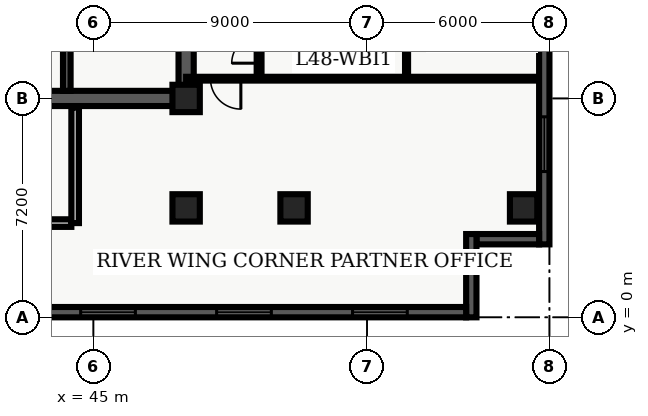
"""IFC4 building model, lengths in metres.
Left out: names, types, materials, properties, quantities, classifications, styles, units other than length and angle.
Written with IfcOpenShell. Run it as: python <this file> out.ifc"""

import sys

from ifc_helpers import new_model, entity, si_unit, converted_unit, direction, frame, origin_with_axes, origin_2d_with_axis, place, context, subcontext, project, spatial, polyline, rectangle, outline, extrude, element, fill, save


model = new_model("IFC4")
c1 = context("Model", 3, precision=1e-05, world=origin_with_axes(), true_north=direction((0.0, 1.0)))
c2 = subcontext(c1, "Body", "Model", "MODEL_VIEW")
j1 = project(units=[si_unit("LENGTHUNIT", "METRE"), converted_unit("PLANEANGLEUNIT", "DEGREE", entity("IfcPlaneAngleMeasure", 0.017), si_unit("PLANEANGLEUNIT", "RADIAN"), dimensions=[0, 0, 0, 0, 0, 0, 0])], contexts=[c1])
p1 = place(None, origin_with_axes())
s1 = spatial("IfcSite", under=j1, at=p1, CompositionType="ELEMENT")
p2 = place(p1, origin_with_axes())
s2 = spatial("IfcBuilding", under=s1, at=p2, CompositionType="ELEMENT")
p3 = place(p2, frame((0.0, 0.0, 196.5), z_axis=(0.0, 0.0, 1.0), x_axis=(1.0, 0.0, 0.0)))
s3 = spatial("IfcBuildingStorey", under=s2, at=p3, CompositionType="ELEMENT", Elevation=196.5)
p4 = place(p3, frame((40.2, 7.2, 0.0), z_axis=(0.0, 0.0, 1.0), x_axis=(1.0, 0.0, 0.0)))
e1 = element("IfcWall", 1, at=p4, inside=s3, PredefinedType="SHEAR", context=c2, shape_type="SweptSolid", body=[
    extrude(outline(polyline([(0.0, -0.25), (7.85, -0.25), (7.85, 0.25), (0.0, 0.25), (0.0, -0.25)])), origin_with_axes(), (0.0, 0.0, 1.0), 3.66),
])
p5 = place(p4, frame((2.175, 0.0, 0.0), z_axis=(0.0, 0.0, 1.0), x_axis=(1.0, 0.0, 0.0)))
e2 = element("IfcOpeningElement", 2, at=p5, cuts=e1, PredefinedType="OPENING", context=c2, shape_type="SweptSolid", body=[
    extrude(rectangle(XDim=1.05, YDim=0.52, at=origin_2d_with_axis()), origin_with_axes(), (0.0, 0.0, 1.0), 2.15),
])
p6 = place(p3, frame((48.05, 7.2, 0.0), z_axis=(0.0, 0.0, 1.0), x_axis=(0.0, 1.0, 0.0)))
e3 = element("IfcWall", 3, at=p6, inside=s3, PredefinedType="SHEAR", context=c2, shape_type="SweptSolid", body=[
    extrude(outline(polyline([(0.0, -0.25), (15.6, -0.25), (15.6, 0.25), (0.0, 0.25), (0.0, -0.25)])), origin_with_axes(), (0.0, 0.0, 1.0), 3.66),
])
p7 = place(p6, frame((5.975, 0.0, 0.0), z_axis=(0.0, 0.0, 1.0), x_axis=(1.0, 0.0, 0.0)))
e4 = element("IfcOpeningElement", 4, at=p7, cuts=e3, PredefinedType="OPENING", context=c2, shape_type="SweptSolid", body=[
    extrude(rectangle(XDim=1.05, YDim=0.52, at=origin_2d_with_axis()), origin_with_axes(), (0.0, 0.0, 1.0), 2.15),
])
p8 = place(p6, frame((2.725, 0.0, 0.0), z_axis=(0.0, 0.0, 1.0), x_axis=(1.0, 0.0, 0.0)))
e5 = element("IfcOpeningElement", 5, at=p8, cuts=e3, PredefinedType="OPENING", context=c2, shape_type="SweptSolid", body=[
    extrude(rectangle(XDim=0.95, YDim=0.52, at=origin_2d_with_axis()), origin_with_axes(), (0.0, 0.0, 1.0), 2.15),
])
p9 = place(p3, frame((44.125, 7.45, 0.0), z_axis=(0.0, 0.0, 1.0), x_axis=(0.0, 1.0, 0.0)))
e6 = element("IfcWall", 6, at=p9, inside=s3, PredefinedType="SHEAR", context=c2, shape_type="SweptSolid", body=[
    extrude(outline(polyline([(0.0, -0.125), (15.1, -0.125), (15.1, 0.125), (0.0, 0.125), (0.0, -0.125)])), origin_with_axes(), (0.0, 0.0, 1.0), 3.66),
])
p10 = place(p3, frame((40.325, 3.1, 0.0), z_axis=(0.0, 0.0, 1.0), x_axis=(1.0, 0.0, 0.0)))
e7 = element("IfcWall", 7, at=p10, inside=s3, PredefinedType="SOLIDWALL", context=c2, shape_type="SweptSolid", body=[
    extrude(outline(polyline([(0.0, -0.125), (3.95, -0.125), (3.95, 0.125), (0.0, 0.125), (0.0, -0.125)])), origin_with_axes(), (0.0, 0.0, 1.0), 2.7),
])
p11 = place(p3, frame((44.4, 3.1, 0.0), z_axis=(0.0, 0.0, 1.0), x_axis=(0.0, 1.0, 0.0)))
e8 = element("IfcWall", 8, at=p11, inside=s3, PredefinedType="SOLIDWALL", context=c2, shape_type="SweptSolid", body=[
    extrude(outline(polyline([(0.0, -0.125), (3.8, -0.125), (3.8, 0.125), (0.0, 0.125), (0.0, -0.125)])), origin_with_axes(), (0.0, 0.0, 1.0), 2.7),
])
for number, where, z_axis, x_axis in (
    (9, (48.05, 3.6, 0.0), (0.0, 0.0, 1.0), (1.0, 0.0, 0.0)),
    (10, (48.05, 7.2, 0.0), (0.0, 0.0, 1.0), (1.0, 0.0, 0.0)),
    (11, (51.6, 3.6, 0.0), (0.0, 0.0, 1.0), (1.0, 0.0, 0.0)),
    (12, (59.15, 3.6, 0.0), (0.0, 0.0, 1.0), (1.0, 0.0, 0.0)),
):
    element("IfcColumn", number, at=place(p3, frame(where, z_axis=z_axis, x_axis=x_axis)), inside=s3, PredefinedType="COLUMN", context=c2, shape_type="SweptSolid", body=[
        extrude(rectangle(XDim=0.9, YDim=0.9, at=origin_2d_with_axis()), origin_with_axes(), (0.0, 0.0, 1.0), 3.9),
    ])
p12 = place(p3, frame((50.45, 7.85, 0.0), z_axis=(0.0, 0.0, 1.0), x_axis=(0.0, 1.0, 0.0)))
e13 = element("IfcWall", 13, at=p12, inside=s3, PredefinedType="PARTITIONING", context=c2, shape_type="SweptSolid", body=[
    extrude(outline(polyline([(0.0, -0.08), (18.8, -0.08), (18.8, 0.08), (0.0, 0.08), (0.0, -0.08)])), origin_with_axes(), (0.0, 0.0, 1.0), 2.7),
])
p13 = place(p12, frame((0.96, 0.0, 0.0), z_axis=(0.0, 0.0, 1.0), x_axis=(1.0, 0.0, 0.0)))
e14 = element("IfcOpeningElement", 14, at=p13, cuts=e13, PredefinedType="OPENING", context=c2, shape_type="SweptSolid", body=[
    extrude(rectangle(XDim=0.9, YDim=0.18, at=origin_2d_with_axis()), origin_with_axes(), (0.0, 0.0, 1.0), 2.15),
])
p14 = place(p12, frame((6.888, 0.0, 0.0), z_axis=(0.0, 0.0, 1.0), x_axis=(1.0, 0.0, 0.0)))
e15 = element("IfcOpeningElement", 15, at=p14, cuts=e13, PredefinedType="OPENING", context=c2, shape_type="SweptSolid", body=[
    extrude(rectangle(XDim=1.0, YDim=0.18, at=origin_2d_with_axis()), origin_with_axes(), (0.0, 0.0, 1.0), 2.15),
])
p15 = place(p12, frame((12.353, 0.0, 0.0), z_axis=(0.0, 0.0, 1.0), x_axis=(1.0, 0.0, 0.0)))
e16 = element("IfcOpeningElement", 16, at=p15, cuts=e13, PredefinedType="OPENING", context=c2, shape_type="SweptSolid", body=[
    extrude(rectangle(XDim=1.0, YDim=0.18, at=origin_2d_with_axis()), origin_with_axes(), (0.0, 0.0, 1.0), 2.15),
])
p16 = place(p12, frame((17.575, 0.0, 0.0), z_axis=(0.0, 0.0, 1.0), x_axis=(1.0, 0.0, 0.0)))
e17 = element("IfcOpeningElement", 17, at=p16, cuts=e13, PredefinedType="OPENING", context=c2, shape_type="SweptSolid", body=[
    extrude(rectangle(XDim=1.0, YDim=0.18, at=origin_2d_with_axis()), origin_with_axes(), (0.0, 0.0, 1.0), 2.15),
])
p17 = place(p3, frame((59.665, 7.85, 0.0), z_axis=(0.0, 0.0, 1.0), x_axis=(-1.0, 0.0, 0.0)))
e18 = element("IfcWall", 18, at=p17, inside=s3, PredefinedType="PARTITIONING", context=c2, shape_type="SweptSolid", body=[
    extrude(outline(polyline([(0.0, -0.062), (11.615, -0.062), (11.615, 0.062), (0.0, 0.062), (0.0, -0.062)])), origin_with_axes(), (0.0, 0.0, 1.0), 2.7),
])
p18 = place(p17, frame((10.315, 0.0, 0.0), z_axis=(0.0, 0.0, 1.0), x_axis=(1.0, 0.0, 0.0)))
e19 = element("IfcOpeningElement", 19, at=p18, cuts=e18, PredefinedType="OPENING", context=c2, shape_type="SweptSolid", body=[
    extrude(rectangle(XDim=1.0, YDim=0.145, at=origin_2d_with_axis()), origin_with_axes(), (0.0, 0.0, 1.0), 2.15),
])
p19 = place(p3, frame((55.3, 7.98, 0.0), z_axis=(0.0, 0.0, 1.0), x_axis=(0.0, 1.0, 0.0)))
e20 = element("IfcWall", 20, at=p19, inside=s3, PredefinedType="PARTITIONING", context=c2, shape_type="SweptSolid", body=[
    extrude(outline(polyline([(0.0, -0.05), (18.54, -0.05), (18.54, 0.05), (0.0, 0.05), (0.0, -0.05)])), origin_with_axes(), (0.0, 0.0, 1.0), 2.7),
])
p20 = place(p19, frame((2.079, 0.0, 0.0), z_axis=(0.0, 0.0, 1.0), x_axis=(1.0, 0.0, 0.0)))
e21 = element("IfcOpeningElement", 21, at=p20, cuts=e20, PredefinedType="OPENING", context=c2, shape_type="SweptSolid", body=[
    extrude(rectangle(XDim=0.95, YDim=0.12, at=origin_2d_with_axis()), origin_with_axes(), (0.0, 0.0, 1.0), 2.15),
])
p21 = place(p19, frame((6.758, 0.0, 0.0), z_axis=(0.0, 0.0, 1.0), x_axis=(1.0, 0.0, 0.0)))
e22 = element("IfcOpeningElement", 22, at=p21, cuts=e20, PredefinedType="OPENING", context=c2, shape_type="SweptSolid", body=[
    extrude(rectangle(XDim=0.95, YDim=0.12, at=origin_2d_with_axis()), origin_with_axes(), (0.0, 0.0, 1.0), 2.15),
])
p22 = place(p19, frame((12.223, 0.0, 0.0), z_axis=(0.0, 0.0, 1.0), x_axis=(1.0, 0.0, 0.0)))
e23 = element("IfcOpeningElement", 23, at=p22, cuts=e20, PredefinedType="OPENING", context=c2, shape_type="SweptSolid", body=[
    extrude(rectangle(XDim=0.95, YDim=0.12, at=origin_2d_with_axis()), origin_with_axes(), (0.0, 0.0, 1.0), 2.15),
])
p23 = place(p19, frame((16.885, 0.0, 0.0), z_axis=(0.0, 0.0, 1.0), x_axis=(1.0, 0.0, 0.0)))
e24 = element("IfcOpeningElement", 24, at=p23, cuts=e20, PredefinedType="OPENING", context=c2, shape_type="SweptSolid", body=[
    extrude(rectangle(XDim=0.95, YDim=0.12, at=origin_2d_with_axis()), origin_with_axes(), (0.0, 0.0, 1.0), 2.15),
])
p24 = place(p3, frame((59.83, 26.06, 0.0), z_axis=(0.0, 0.0, 1.0), x_axis=(0.0, -1.0, 0.0)))
e25 = element("IfcWall", 25, at=p24, inside=s3, PredefinedType="SOLIDWALL", context=c2, shape_type="SweptSolid", body=[
    extrude(outline(polyline([(0.0, -0.17), (23.66, -0.17), (23.66, 0.17), (0.0, 0.17), (0.0, -0.17)])), origin_with_axes(), (0.0, 0.0, 1.0), 3.66),
])
p25 = place(p24, frame((11.83, 0.0, 0.45), z_axis=(0.0, 0.0, 1.0), x_axis=(1.0, 0.0, 0.0)))
e26 = element("IfcOpeningElement", 26, at=p25, cuts=e25, PredefinedType="OPENING", context=c2, shape_type="SweptSolid", body=[
    extrude(rectangle(XDim=1.8, YDim=0.36, at=origin_2d_with_axis()), origin_with_axes(), (0.0, 0.0, 1.0), 2.1),
])
p26 = place(p24, frame((20.364, 0.0, 0.45), z_axis=(0.0, 0.0, 1.0), x_axis=(1.0, 0.0, 0.0)))
e27 = element("IfcOpeningElement", 27, at=p26, cuts=e25, PredefinedType="OPENING", context=c2, shape_type="SweptSolid", body=[
    extrude(rectangle(XDim=1.8, YDim=0.36, at=origin_2d_with_axis()), origin_with_axes(), (0.0, 0.0, 1.0), 2.1),
])
p27 = place(p3, frame((59.66, 2.57, 0.0), z_axis=(0.0, 0.0, 1.0), x_axis=(-1.0, 0.0, 0.0)))
e28 = element("IfcWall", 28, at=p27, inside=s3, PredefinedType="SOLIDWALL", context=c2, shape_type="SweptSolid", body=[
    extrude(outline(polyline([(0.0, -0.17), (2.06, -0.17), (2.06, 0.17), (0.0, 0.17), (0.0, -0.17)])), origin_with_axes(), (0.0, 0.0, 1.0), 3.66),
])
p28 = place(p3, frame((57.43, 2.74, 0.0), z_axis=(0.0, 0.0, 1.0), x_axis=(0.0, -1.0, 0.0)))
e29 = element("IfcWall", 29, at=p28, inside=s3, PredefinedType="SOLIDWALL", context=c2, shape_type="SweptSolid", body=[
    extrude(outline(polyline([(0.0, -0.17), (2.74, -0.17), (2.74, 0.17), (0.0, 0.17), (0.0, -0.17)])), origin_with_axes(), (0.0, 0.0, 1.0), 3.66),
])
p29 = place(p3, frame((57.26, 0.17, 0.0), z_axis=(0.0, 0.0, 1.0), x_axis=(-1.0, 0.0, 0.0)))
e30 = element("IfcWall", 30, at=p29, inside=s3, PredefinedType="SOLIDWALL", context=c2, shape_type="SweptSolid", body=[
    extrude(outline(polyline([(0.0, -0.17), (54.86, -0.17), (54.86, 0.17), (0.0, 0.17), (0.0, -0.17)])), origin_with_axes(), (0.0, 0.0, 1.0), 3.66),
])
p30 = place(p29, frame((2.836, 0.0, 0.45), z_axis=(0.0, 0.0, 1.0), x_axis=(1.0, 0.0, 0.0)))
e31 = element("IfcOpeningElement", 31, at=p30, cuts=e30, PredefinedType="OPENING", context=c2, shape_type="SweptSolid", body=[
    extrude(rectangle(XDim=1.8, YDim=0.36, at=origin_2d_with_axis()), origin_with_axes(), (0.0, 0.0, 1.0), 2.1),
])
p31 = place(p29, frame((7.307, 0.0, 0.45), z_axis=(0.0, 0.0, 1.0), x_axis=(1.0, 0.0, 0.0)))
e32 = element("IfcOpeningElement", 32, at=p31, cuts=e30, PredefinedType="OPENING", context=c2, shape_type="SweptSolid", body=[
    extrude(rectangle(XDim=1.8, YDim=0.36, at=origin_2d_with_axis()), origin_with_axes(), (0.0, 0.0, 1.0), 2.1),
])
p32 = place(p29, frame((11.779, 0.0, 0.45), z_axis=(0.0, 0.0, 1.0), x_axis=(1.0, 0.0, 0.0)))
e33 = element("IfcOpeningElement", 33, at=p32, cuts=e30, PredefinedType="OPENING", context=c2, shape_type="SweptSolid", body=[
    extrude(rectangle(XDim=1.8, YDim=0.36, at=origin_2d_with_axis()), origin_with_axes(), (0.0, 0.0, 1.0), 2.1),
])
p33 = place(p29, frame((16.251, 0.0, 0.45), z_axis=(0.0, 0.0, 1.0), x_axis=(1.0, 0.0, 0.0)))
e34 = element("IfcOpeningElement", 34, at=p33, cuts=e30, PredefinedType="OPENING", context=c2, shape_type="SweptSolid", body=[
    extrude(rectangle(XDim=1.8, YDim=0.36, at=origin_2d_with_axis()), origin_with_axes(), (0.0, 0.0, 1.0), 2.1),
])
p34 = place(p29, frame((20.723, 0.0, 0.45), z_axis=(0.0, 0.0, 1.0), x_axis=(1.0, 0.0, 0.0)))
e35 = element("IfcOpeningElement", 35, at=p34, cuts=e30, PredefinedType="OPENING", context=c2, shape_type="SweptSolid", body=[
    extrude(rectangle(XDim=1.8, YDim=0.36, at=origin_2d_with_axis()), origin_with_axes(), (0.0, 0.0, 1.0), 2.1),
])
p35 = place(p29, frame((34.138, 0.0, 0.45), z_axis=(0.0, 0.0, 1.0), x_axis=(1.0, 0.0, 0.0)))
e36 = element("IfcOpeningElement", 36, at=p35, cuts=e30, PredefinedType="OPENING", context=c2, shape_type="SweptSolid", body=[
    extrude(rectangle(XDim=1.8, YDim=0.36, at=origin_2d_with_axis()), origin_with_axes(), (0.0, 0.0, 1.0), 2.1),
])
p36 = place(p29, frame((38.609, 0.0, 0.45), z_axis=(0.0, 0.0, 1.0), x_axis=(1.0, 0.0, 0.0)))
e37 = element("IfcOpeningElement", 37, at=p36, cuts=e30, PredefinedType="OPENING", context=c2, shape_type="SweptSolid", body=[
    extrude(rectangle(XDim=1.8, YDim=0.36, at=origin_2d_with_axis()), origin_with_axes(), (0.0, 0.0, 1.0), 2.1),
])
p37 = place(p29, frame((43.531, 0.0, 0.45), z_axis=(0.0, 0.0, 1.0), x_axis=(1.0, 0.0, 0.0)))
e38 = element("IfcOpeningElement", 38, at=p37, cuts=e30, PredefinedType="OPENING", context=c2, shape_type="SweptSolid", body=[
    extrude(rectangle(XDim=1.8, YDim=0.36, at=origin_2d_with_axis()), origin_with_axes(), (0.0, 0.0, 1.0), 2.1),
])
p38 = place(p29, frame((47.553, 0.0, 0.45), z_axis=(0.0, 0.0, 1.0), x_axis=(1.0, 0.0, 0.0)))
e39 = element("IfcOpeningElement", 39, at=p38, cuts=e30, PredefinedType="OPENING", context=c2, shape_type="SweptSolid", body=[
    extrude(rectangle(XDim=1.8, YDim=0.36, at=origin_2d_with_axis()), origin_with_axes(), (0.0, 0.0, 1.0), 2.1),
])
p39 = place(p29, frame((52.024, 0.0, 0.45), z_axis=(0.0, 0.0, 1.0), x_axis=(1.0, 0.0, 0.0)))
e40 = element("IfcOpeningElement", 40, at=p39, cuts=e30, PredefinedType="OPENING", context=c2, shape_type="SweptSolid", body=[
    extrude(rectangle(XDim=1.8, YDim=0.36, at=origin_2d_with_axis()), origin_with_axes(), (0.0, 0.0, 1.0), 2.1),
])
p40 = place(p17, frame((10.315, 0.0, 0.0), z_axis=(0.0, 0.0, 1.0), x_axis=(1.0, 0.0, 0.0)))
e41 = element("IfcDoor", 41, at=p40, inside=s3, OperationType="SINGLE_SWING_LEFT", PredefinedType="DOOR", context=c2, shape_type="SweptSolid", body=[
    extrude(rectangle(XDim=1.0, YDim=0.075, at=origin_2d_with_axis()), origin_with_axes(), (0.0, 0.0, 1.0), 2.15),
])
fill(e19, e41)
p41 = place(p12, frame((0.96, 0.0, 0.0), z_axis=(0.0, 0.0, 1.0), x_axis=(1.0, 0.0, 0.0)))
e42 = element("IfcDoor", 42, at=p41, inside=s3, OperationType="SINGLE_SWING_LEFT", PredefinedType="DOOR", context=c2, shape_type="SweptSolid", body=[
    extrude(rectangle(XDim=0.9, YDim=0.09, at=origin_2d_with_axis()), origin_with_axes(), (0.0, 0.0, 1.0), 2.15),
])
fill(e14, e42)
p42 = place(p24, frame((20.364, 0.0, 0.45), z_axis=(0.0, 0.0, 1.0), x_axis=(1.0, 0.0, 0.0)))
e43 = element("IfcWindow", 43, at=p42, inside=s3, PredefinedType="WINDOW", context=c2, shape_type="SweptSolid", body=[
    extrude(rectangle(XDim=1.8, YDim=0.09, at=origin_2d_with_axis()), origin_with_axes(), (0.0, 0.0, 1.0), 2.1),
])
fill(e27, e43)
p43 = place(p29, frame((2.836, 0.0, 0.45), z_axis=(0.0, 0.0, 1.0), x_axis=(1.0, 0.0, 0.0)))
e44 = element("IfcWindow", 44, at=p43, inside=s3, PredefinedType="WINDOW", context=c2, shape_type="SweptSolid", body=[
    extrude(rectangle(XDim=1.8, YDim=0.09, at=origin_2d_with_axis()), origin_with_axes(), (0.0, 0.0, 1.0), 2.1),
])
fill(e31, e44)
p44 = place(p29, frame((7.307, 0.0, 0.45), z_axis=(0.0, 0.0, 1.0), x_axis=(1.0, 0.0, 0.0)))
e45 = element("IfcWindow", 45, at=p44, inside=s3, PredefinedType="WINDOW", context=c2, shape_type="SweptSolid", body=[
    extrude(rectangle(XDim=1.8, YDim=0.09, at=origin_2d_with_axis()), origin_with_axes(), (0.0, 0.0, 1.0), 2.1),
])
fill(e32, e45)
p45 = place(p29, frame((11.779, 0.0, 0.45), z_axis=(0.0, 0.0, 1.0), x_axis=(1.0, 0.0, 0.0)))
e46 = element("IfcWindow", 46, at=p45, inside=s3, PredefinedType="WINDOW", context=c2, shape_type="SweptSolid", body=[
    extrude(rectangle(XDim=1.8, YDim=0.09, at=origin_2d_with_axis()), origin_with_axes(), (0.0, 0.0, 1.0), 2.1),
])
fill(e33, e46)
save(model, sys.argv[1])
